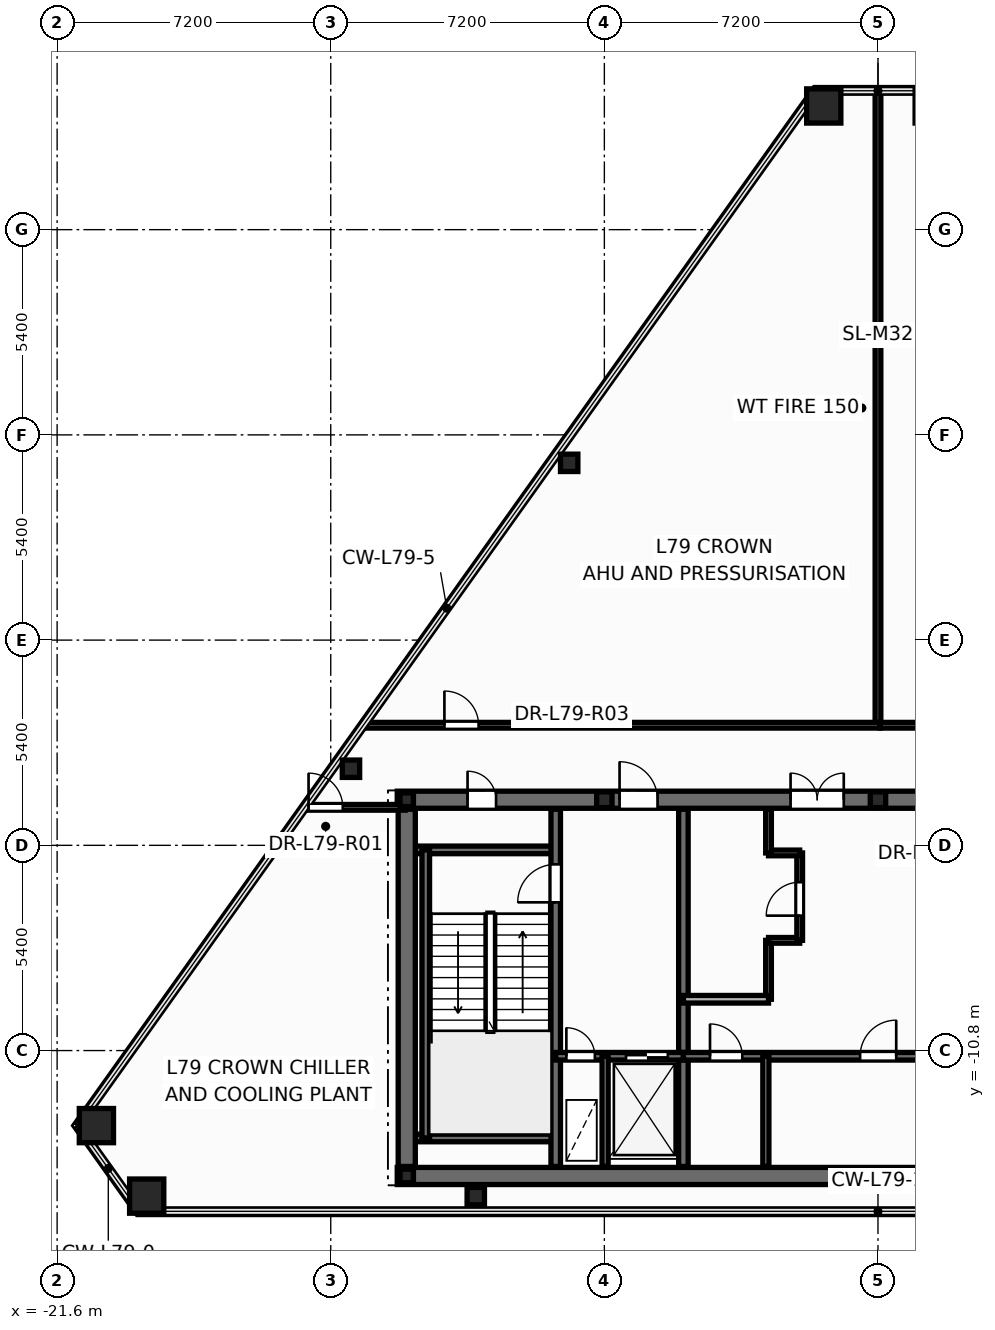
"""IFC4 building model, lengths in metres.
Left out: names, types, materials, properties, quantities, classifications, styles, units other than length and angle.
Written with IfcOpenShell. Run it as: python <this file> out.ifc"""

import sys

from ifc_helpers import new_model, si_unit, direction, frame, frame_2d, origin, origin_2d, place, context, subcontext, project, spatial, rectangle, hollow_rectangle, hollow_circle, i_section, extrude, element, fill, save


model = new_model("IFC4")
c1 = context("Model", 3, precision=1e-05, world=origin(), true_north=direction((0.0, 1.0)))
c2 = subcontext(c1, "Body", "Model", "MODEL_VIEW")
j1 = project(units=[si_unit("LENGTHUNIT", "METRE"), si_unit("PLANEANGLEUNIT", "RADIAN")], contexts=[c1])
p1 = place(None, origin())
s1 = spatial("IfcSite", under=j1, at=p1, CompositionType="ELEMENT")
p2 = place(p1, origin())
s2 = spatial("IfcBuilding", under=s1, at=p2, CompositionType="ELEMENT")
p3 = place(p2, frame((0.0, 0.0, 301.8)))
s3 = spatial("IfcBuildingStorey", under=s2, at=p3, CompositionType="ELEMENT", Elevation=301.8)
for number, where, z_axis, x_axis in (
    (1, (-20.567, -12.775, 0.0), (0.0, 0.0, 1.0), (1.0, 0.0, 0.0)),
    (2, (-19.243, -14.63, 0.0), (0.0, 0.0, 1.0), (1.0, 0.0, 0.0)),
    (3, (1.427, 14.055, 0.0), (0.0, 0.0, 1.0), (1.0, 0.0, 0.0)),
    (4, (-1.427, 14.055, 0.0), (0.0, 0.0, 1.0), (1.0, 0.0, 0.0)),
):
    element("IfcColumn", number, at=place(p3, frame(where, z_axis=z_axis, x_axis=x_axis)), inside=s3, PredefinedType="COLUMN", context=c2, shape_type="SweptSolid", body=[
        extrude(hollow_rectangle(XDim=0.9, YDim=0.9, WallThickness=0.04, at=origin_2d()), origin(), (0.0, 0.0, 1.0), 4.2),
    ])
for number, where, z_axis, x_axis in (
    (5, (-10.583, -14.63, 0.0), (0.0, 0.0, 1.0), (1.0, 0.0, 0.0)),
    (6, (-8.126, 4.664, 0.0), (0.0, 0.0, 1.0), (1.0, 0.0, 0.0)),
    (7, (-13.868, -3.385, 0.0), (0.0, 0.0, 1.0), (1.0, 0.0, 0.0)),
):
    element("IfcColumn", number, at=place(p3, frame(where, z_axis=z_axis, x_axis=x_axis)), inside=s3, PredefinedType="COLUMN", context=c2, shape_type="SweptSolid", body=[
        extrude(hollow_circle(Radius=0.229, WallThickness=0.016, at=origin_2d()), origin(), (0.0, 0.0, 1.0), 4.2),
    ])
for number, where, z_axis, x_axis in (
    (8, (-12.4, -14.1, 0.0), (0.0, 0.0, 1.0), (1.0, 0.0, 0.0)),
    (9, (-12.4, -4.2, 0.0), (0.0, 0.0, 1.0), (1.0, 0.0, 0.0)),
):
    element("IfcColumn", number, at=place(p3, frame(where, z_axis=z_axis, x_axis=x_axis)), inside=s3, PredefinedType="COLUMN", context=c2, shape_type="SweptSolid", body=[
        extrude(i_section(OverallWidth=0.352, OverallDepth=0.359, WebThickness=0.018, FlangeThickness=0.026, at=origin_2d()), origin(), (0.0, 0.0, 1.0), 4.2),
    ])
for number, where, z_axis, x_axis in (
    (10, (-7.2, -4.2, 0.0), (0.0, 0.0, 1.0), (1.0, 0.0, 0.0)),
    (11, (0.0, -4.2, 0.0), (0.0, 0.0, 1.0), (1.0, 0.0, 0.0)),
):
    element("IfcColumn", number, at=place(p3, frame(where, z_axis=z_axis, x_axis=x_axis)), inside=s3, PredefinedType="PILASTER", context=c2, shape_type="SweptSolid", body=[
        extrude(i_section(OverallWidth=0.405, OverallDepth=0.414, WebThickness=0.022, FlangeThickness=0.032, at=origin_2d()), origin(), (0.0, 0.0, 1.0), 4.2),
    ])
p4 = place(p3, frame((-2.88, -9.45, 0.0), z_axis=(0.0, 0.0, 1.0), x_axis=(0.0, 1.0, 0.0)))
e12 = element("IfcWall", 12, at=p4, inside=s3, PredefinedType="PARTITIONING", context=c2, shape_type="SweptSolid", body=[
    extrude(rectangle(XDim=1.55, YDim=0.15, at=frame_2d((0.775, 0.0))), origin(), (0.0, 0.0, 1.0), 3.88),
])
p5 = place(p3, frame((-2.88, -7.9, 0.0), z_axis=(0.0, 0.0, 1.0), x_axis=(1.0, 0.0, 0.0)))
e13 = element("IfcWall", 13, at=p5, inside=s3, PredefinedType="PARTITIONING", context=c2, shape_type="SweptSolid", body=[
    extrude(rectangle(XDim=0.82, YDim=0.15, at=frame_2d((0.41, 0.0))), origin(), (0.0, 0.0, 1.0), 3.88),
])
p6 = place(p3, frame((-2.06, -7.9, 0.0), z_axis=(0.0, 0.0, 1.0), x_axis=(0.0, 1.0, 0.0)))
e14 = element("IfcWall", 14, at=p6, inside=s3, PredefinedType="PARTITIONING", context=c2, shape_type="SweptSolid", body=[
    extrude(rectangle(XDim=2.3, YDim=0.15, at=frame_2d((1.15, 0.0))), origin(), (0.0, 0.0, 1.0), 3.88),
])
p7 = place(p6, frame((0.65, 0.0, 0.0)))
e15 = element("IfcOpeningElement", 15, at=p7, cuts=e14, PredefinedType="OPENING", context=c2, shape_type="SweptSolid", body=[
    extrude(rectangle(XDim=0.886, YDim=2.104, at=frame_2d((0.44, 1.052))), frame((0.0, 0.085, 0.0), z_axis=(0.0, -1.0, 0.0), x_axis=(1.0, 0.0, 0.0)), (0.0, 0.0, 1.0), 0.17),
])
p8 = place(p3, frame((-2.88, -5.6, 0.0), z_axis=(0.0, 0.0, 1.0), x_axis=(1.0, 0.0, 0.0)))
e16 = element("IfcWall", 16, at=p8, inside=s3, PredefinedType="PARTITIONING", context=c2, shape_type="SweptSolid", body=[
    extrude(rectangle(XDim=0.82, YDim=0.15, at=frame_2d((0.41, 0.0))), origin(), (0.0, 0.0, 1.0), 3.88),
])
p9 = place(p3, frame((-2.88, -5.6, 0.0), z_axis=(0.0, 0.0, 1.0), x_axis=(0.0, 1.0, 0.0)))
e17 = element("IfcWall", 17, at=p9, inside=s3, PredefinedType="PARTITIONING", context=c2, shape_type="SweptSolid", body=[
    extrude(rectangle(XDim=1.15, YDim=0.15, at=frame_2d((0.575, 0.0))), origin(), (0.0, 0.0, 1.0), 3.88),
])
p10 = place(p3, frame((-12.65, -14.1, 0.0), z_axis=(0.0, 0.0, 1.0), x_axis=(1.0, 0.0, 0.0)))
e18 = element("IfcWall", 18, at=p10, inside=s3, PredefinedType="SHEAR", context=c2, shape_type="SweptSolid", body=[
    extrude(rectangle(XDim=25.3, YDim=0.45, at=frame_2d((12.65, 0.0))), origin(), (0.0, 0.0, 1.0), 4.2),
])
p11 = place(p3, frame((-12.65, -4.2, 0.0), z_axis=(0.0, 0.0, 1.0), x_axis=(1.0, 0.0, 0.0)))
e19 = element("IfcWall", 19, at=p11, inside=s3, PredefinedType="SHEAR", context=c2, shape_type="SweptSolid", body=[
    extrude(rectangle(XDim=25.3, YDim=0.45, at=frame_2d((12.65, 0.0))), origin(), (0.0, 0.0, 1.0), 4.2),
])
p12 = place(p11, frame((1.85, 0.0, 0.0)))
e20 = element("IfcOpeningElement", 20, at=p12, cuts=e19, PredefinedType="OPENING", context=c2, shape_type="SweptSolid", body=[
    extrude(rectangle(XDim=0.756, YDim=2.054, at=frame_2d((0.375, 1.027))), frame((0.0, 0.235, 0.0), z_axis=(0.0, -1.0, 0.0), x_axis=(1.0, 0.0, 0.0)), (0.0, 0.0, 1.0), 0.47),
])
p13 = place(p11, frame((21.85, 0.0, 0.0)))
e21 = element("IfcOpeningElement", 21, at=p13, cuts=e19, PredefinedType="OPENING", context=c2, shape_type="SweptSolid", body=[
    extrude(rectangle(XDim=0.756, YDim=2.054, at=frame_2d((0.375, 1.027))), frame((0.0, 0.235, 0.0), z_axis=(0.0, -1.0, 0.0), x_axis=(1.0, 0.0, 0.0)), (0.0, 0.0, 1.0), 0.47),
])
p14 = place(p11, frame((23.5, 0.0, 0.0)))
e22 = element("IfcOpeningElement", 22, at=p14, cuts=e19, PredefinedType="OPENING", context=c2, shape_type="SweptSolid", body=[
    extrude(rectangle(XDim=0.756, YDim=2.054, at=frame_2d((0.375, 1.027))), frame((0.0, 0.235, 0.0), z_axis=(0.0, -1.0, 0.0), x_axis=(1.0, 0.0, 0.0)), (0.0, 0.0, 1.0), 0.47),
])
p15 = place(p11, frame((5.85, 0.0, 0.0)))
e23 = element("IfcOpeningElement", 23, at=p15, cuts=e19, PredefinedType="OPENING", context=c2, shape_type="SweptSolid", body=[
    extrude(rectangle(XDim=1.006, YDim=2.104, at=frame_2d((0.5, 1.052))), frame((0.0, 0.235, 0.0), z_axis=(0.0, -1.0, 0.0), x_axis=(1.0, 0.0, 0.0)), (0.0, 0.0, 1.0), 0.47),
])
p16 = place(p11, frame((10.35, 0.0, 0.0)))
e24 = element("IfcOpeningElement", 24, at=p16, cuts=e19, PredefinedType="OPENING", context=c2, shape_type="SweptSolid", body=[
    extrude(rectangle(XDim=1.406, YDim=2.154, at=frame_2d((0.7, 1.077))), frame((0.0, 0.235, 0.0), z_axis=(0.0, -1.0, 0.0), x_axis=(1.0, 0.0, 0.0)), (0.0, 0.0, 1.0), 0.47),
])
p17 = place(p11, frame((18.45, 0.0, 0.0)))
e25 = element("IfcOpeningElement", 25, at=p17, cuts=e19, PredefinedType="OPENING", context=c2, shape_type="SweptSolid", body=[
    extrude(rectangle(XDim=1.006, YDim=2.104, at=frame_2d((0.5, 1.052))), frame((0.0, 0.235, 0.0), z_axis=(0.0, -1.0, 0.0), x_axis=(1.0, 0.0, 0.0)), (0.0, 0.0, 1.0), 0.47),
])
for number, where, z_axis, x_axis in (
    (26, (-12.35, -5.52, 0.0), (0.0, 0.0, 1.0), (1.0, 0.0, 0.0)),
    (27, (-12.35, -13.1, 0.0), (0.0, 0.0, 1.0), (1.0, 0.0, 0.0)),
):
    element("IfcWall", number, at=place(p3, frame(where, z_axis=z_axis, x_axis=x_axis)), inside=s3, PredefinedType="SOLIDWALL", context=c2, shape_type="SweptSolid", body=[
        extrude(rectangle(XDim=3.87, YDim=0.2, at=frame_2d((1.935, 0.0))), origin(), (0.0, 0.0, 1.0), 4.2),
    ])
p18 = place(p3, frame((-11.9, -13.1, 0.0), z_axis=(0.0, 0.0, 1.0), x_axis=(0.0, 1.0, 0.0)))
e28 = element("IfcWall", 28, at=p18, inside=s3, PredefinedType="SOLIDWALL", context=c2, shape_type="SweptSolid", body=[
    extrude(rectangle(XDim=7.58, YDim=0.2, at=frame_2d((3.79, 0.0))), origin(), (0.0, 0.0, 1.0), 4.2),
])
p19 = place(p3, frame((-8.48, -13.85, 0.0), z_axis=(0.0, 0.0, 1.0), x_axis=(0.0, 1.0, 0.0)))
e29 = element("IfcWall", 29, at=p19, inside=s3, PredefinedType="SHEAR", context=c2, shape_type="SweptSolid", body=[
    extrude(rectangle(XDim=9.4, YDim=0.25, at=frame_2d((4.7, 0.0))), origin(), (0.0, 0.0, 1.0), 4.2),
])
p20 = place(p19, frame((6.95, 0.0, 0.0)))
e30 = element("IfcOpeningElement", 30, at=p20, cuts=e29, PredefinedType="OPENING", context=c2, shape_type="SweptSolid", body=[
    extrude(rectangle(XDim=1.006, YDim=2.104, at=frame_2d((0.5, 1.052))), frame((0.0, 0.135, 0.0), z_axis=(0.0, -1.0, 0.0), x_axis=(1.0, 0.0, 0.0)), (0.0, 0.0, 1.0), 0.27),
])
p21 = place(p3, frame((-5.12, -13.85, 0.0), z_axis=(0.0, 0.0, 1.0), x_axis=(0.0, 1.0, 0.0)))
e31 = element("IfcWall", 31, at=p21, inside=s3, PredefinedType="SHEAR", context=c2, shape_type="SweptSolid", body=[
    extrude(rectangle(XDim=9.4, YDim=0.25, at=frame_2d((4.7, 0.0))), origin(), (0.0, 0.0, 1.0), 4.2),
])
p22 = place(p3, frame((-8.48, -10.95, 0.0), z_axis=(0.0, 0.0, 1.0), x_axis=(1.0, 0.0, 0.0)))
e32 = element("IfcWall", 32, at=p22, inside=s3, PredefinedType="SOLIDWALL", context=c2, shape_type="SweptSolid", body=[
    extrude(rectangle(XDim=3.36, YDim=0.2, at=frame_2d((1.68, 0.0))), origin(), (0.0, 0.0, 1.0), 4.2),
])
p23 = place(p22, frame((0.28, 0.0, 0.0)))
e33 = element("IfcOpeningElement", 33, at=p23, cuts=e32, PredefinedType="OPENING", context=c2, shape_type="SweptSolid", body=[
    extrude(rectangle(XDim=0.756, YDim=2.054, at=frame_2d((0.375, 1.027))), frame((0.0, 0.11, 0.0), z_axis=(0.0, -1.0, 0.0), x_axis=(1.0, 0.0, 0.0)), (0.0, 0.0, 1.0), 0.22),
])
p24 = place(p22, frame((1.85, 0.0, 0.0)))
e34 = element("IfcOpeningElement", 34, at=p24, cuts=e32, PredefinedType="OPENING", context=c2, shape_type="SweptSolid", body=[
    extrude(rectangle(XDim=1.106, YDim=2.104, at=frame_2d((0.55, 1.052))), frame((0.0, 0.11, 0.0), z_axis=(0.0, -1.0, 0.0), x_axis=(1.0, 0.0, 0.0)), (0.0, 0.0, 1.0), 0.22),
])
p25 = place(p3, frame((-5.12, -10.95, 0.0), z_axis=(0.0, 0.0, 1.0), x_axis=(1.0, 0.0, 0.0)))
e35 = element("IfcWall", 35, at=p25, inside=s3, PredefinedType="SOLIDWALL", context=c2, shape_type="SweptSolid", body=[
    extrude(rectangle(XDim=10.24, YDim=0.2, at=frame_2d((5.12, 0.0))), origin(), (0.0, 0.0, 1.0), 4.2),
])
p26 = place(p25, frame((0.7, 0.0, 0.0)))
e36 = element("IfcOpeningElement", 36, at=p26, cuts=e35, PredefinedType="OPENING", context=c2, shape_type="SweptSolid", body=[
    extrude(rectangle(XDim=0.856, YDim=2.054, at=frame_2d((0.425, 1.027))), frame((0.0, 0.11, 0.0), z_axis=(0.0, -1.0, 0.0), x_axis=(1.0, 0.0, 0.0)), (0.0, 0.0, 1.0), 0.22),
])
p27 = place(p25, frame((4.65, 0.0, 0.0)))
e37 = element("IfcOpeningElement", 37, at=p27, cuts=e35, PredefinedType="OPENING", context=c2, shape_type="SweptSolid", body=[
    extrude(rectangle(XDim=0.956, YDim=2.104, at=frame_2d((0.475, 1.052))), frame((0.0, 0.11, 0.0), z_axis=(0.0, -1.0, 0.0), x_axis=(1.0, 0.0, 0.0)), (0.0, 0.0, 1.0), 0.22),
])
p28 = place(p25, frame((8.54, 0.0, 0.0)))
e38 = element("IfcOpeningElement", 38, at=p28, cuts=e35, PredefinedType="OPENING", context=c2, shape_type="SweptSolid", body=[
    extrude(rectangle(XDim=1.106, YDim=2.104, at=frame_2d((0.55, 1.052))), frame((0.0, 0.11, 0.0), z_axis=(0.0, -1.0, 0.0), x_axis=(1.0, 0.0, 0.0)), (0.0, 0.0, 1.0), 0.22),
])
for number, where, z_axis, x_axis in (
    (39, (-7.18, -13.85, 0.0), (0.0, 0.0, 1.0), (0.0, 1.0, 0.0)),
    (40, (-2.95, -13.85, 0.0), (0.0, 0.0, 1.0), (0.0, 1.0, 0.0)),
):
    element("IfcWall", number, at=place(p3, frame(where, z_axis=z_axis, x_axis=x_axis)), inside=s3, PredefinedType="PARTITIONING", context=c2, shape_type="SweptSolid", body=[
        extrude(rectangle(XDim=2.9, YDim=0.16, at=frame_2d((1.45, 0.0))), origin(), (0.0, 0.0, 1.0), 3.105),
    ])
p29 = place(p3, frame((-12.4, -13.85, 0.0), z_axis=(0.0, 0.0, 1.0), x_axis=(0.0, 1.0, 0.0)))
e41 = element("IfcWall", 41, at=p29, inside=s3, PredefinedType="SHEAR", context=c2, shape_type="SweptSolid", body=[
    extrude(rectangle(XDim=9.4, YDim=0.45, at=frame_2d((4.7, 0.0))), origin(), (0.0, 0.0, 1.0), 4.2),
])
p30 = place(p3, frame((-5.12, -9.45, 0.0), z_axis=(0.0, 0.0, 1.0), x_axis=(1.0, 0.0, 0.0)))
e42 = element("IfcWall", 42, at=p30, inside=s3, PredefinedType="SOLIDWALL", context=c2, shape_type="SweptSolid", body=[
    extrude(rectangle(XDim=2.24, YDim=0.2, at=frame_2d((1.12, 0.0))), origin(), (0.0, 0.0, 1.0), 3.88),
])
p31 = place(p3, frame((0.0, -2.24, 0.0), z_axis=(0.0, 0.0, 1.0), x_axis=(0.0, 1.0, 0.0)))
e43 = element("IfcWall", 43, at=p31, inside=s3, PredefinedType="PARTITIONING", context=c2, shape_type="SweptSolid", body=[
    extrude(rectangle(XDim=16.695, YDim=0.15, at=frame_2d((8.347, 0.0))), origin(), (0.0, 0.0, 1.0), 2.855),
])
p32 = place(p3, frame((-13.543, -2.24, 0.0), z_axis=(0.0, 0.0, 1.0), x_axis=(1.0, 0.0, 0.0)))
e44 = element("IfcWall", 44, at=p32, inside=s3, PredefinedType="PARTITIONING", context=c2, shape_type="SweptSolid", body=[
    extrude(rectangle(XDim=13.603, YDim=0.15, at=frame_2d((6.801, 0.0))), origin(), (0.0, 0.0, 1.0), 2.855),
])
p33 = place(p32, frame((2.134, 0.0, 0.0)))
e45 = element("IfcOpeningElement", 45, at=p33, cuts=e44, PredefinedType="OPENING", context=c2, shape_type="SweptSolid", body=[
    extrude(rectangle(XDim=0.906, YDim=2.104, at=frame_2d((0.45, 1.052))), frame((0.0, 0.085, 0.0), z_axis=(0.0, -1.0, 0.0), x_axis=(1.0, 0.0, 0.0)), (0.0, 0.0, 1.0), 0.17),
])
p34 = place(p3, frame((0.062, -2.24, 0.0), z_axis=(0.0, 0.0, 1.0), x_axis=(1.0, 0.0, 0.0)))
e46 = element("IfcWall", 46, at=p34, inside=s3, PredefinedType="PARTITIONING", context=c2, shape_type="SweptSolid", body=[
    extrude(rectangle(XDim=13.481, YDim=0.15, at=frame_2d((6.74, 0.0))), origin(), (0.0, 0.0, 1.0), 2.855),
])
p35 = place(p34, frame((0.995, 0.0, 0.0)))
e47 = element("IfcOpeningElement", 47, at=p35, cuts=e46, PredefinedType="OPENING", context=c2, shape_type="SweptSolid", body=[
    extrude(rectangle(XDim=0.906, YDim=2.104, at=frame_2d((0.45, 1.052))), frame((0.0, 0.085, 0.0), z_axis=(0.0, -1.0, 0.0), x_axis=(1.0, 0.0, 0.0)), (0.0, 0.0, 1.0), 0.17),
])
p36 = place(p3, frame((-15.083, -4.4, 0.0), z_axis=(0.0, 0.0, 1.0), x_axis=(1.0, 0.0, 0.0)))
e48 = element("IfcWall", 48, at=p36, inside=s3, PredefinedType="PARTITIONING", context=c2, shape_type="SweptSolid", body=[
    extrude(rectangle(XDim=2.644, YDim=0.15, at=frame_2d((1.322, 0.0))), origin(), (0.0, 0.0, 1.0), 2.855),
])
p37 = place(p36, frame((0.1, 0.0, 0.0)))
e49 = element("IfcOpeningElement", 49, at=p37, cuts=e48, PredefinedType="OPENING", context=c2, shape_type="SweptSolid", body=[
    extrude(rectangle(XDim=0.906, YDim=2.104, at=frame_2d((0.45, 1.052))), frame((0.0, 0.085, 0.0), z_axis=(0.0, -1.0, 0.0), x_axis=(1.0, 0.0, 0.0)), (0.0, 0.0, 1.0), 0.17),
])
p38 = place(p7, origin())
e50 = element("IfcDoor", 50, at=p38, inside=s3, OperationType="SINGLE_SWING_LEFT", PredefinedType="DOOR", context=c2, shape_type="SweptSolid", body=[
    extrude(rectangle(XDim=0.88, YDim=2.1, at=frame_2d((0.44, 1.05))), frame((0.0, 0.025, 0.0), z_axis=(0.0, -1.0, 0.0), x_axis=(1.0, 0.0, 0.0)), (0.0, 0.0, 1.0), 0.05),
])
fill(e15, e50)
p39 = place(p20, origin())
e51 = element("IfcDoor", 51, at=p39, inside=s3, OperationType="SINGLE_SWING_LEFT", PredefinedType="DOOR", context=c2, shape_type="SweptSolid", body=[
    extrude(rectangle(XDim=1.0, YDim=2.1, at=frame_2d((0.5, 1.05))), frame((0.0, 0.025, 0.0), z_axis=(0.0, -1.0, 0.0), x_axis=(1.0, 0.0, 0.0)), (0.0, 0.0, 1.0), 0.05),
])
fill(e30, e51)
p40 = place(p23, origin())
e52 = element("IfcDoor", 52, at=p40, inside=s3, OperationType="SINGLE_SWING_LEFT", PredefinedType="DOOR", context=c2, shape_type="SweptSolid", body=[
    extrude(rectangle(XDim=0.75, YDim=2.05, at=frame_2d((0.375, 1.025))), frame((0.0, 0.025, 0.0), z_axis=(0.0, -1.0, 0.0), x_axis=(1.0, 0.0, 0.0)), (0.0, 0.0, 1.0), 0.05),
])
fill(e33, e52)
p41 = place(p24, origin())
e53 = element("IfcDoor", 53, at=p41, inside=s3, OperationType="DOUBLE_DOOR_SLIDING", PredefinedType="DOOR", context=c2, shape_type="SweptSolid", body=[
    extrude(rectangle(XDim=1.1, YDim=2.1, at=frame_2d((0.55, 1.05))), frame((0.0, 0.025, 0.0), z_axis=(0.0, -1.0, 0.0), x_axis=(1.0, 0.0, 0.0)), (0.0, 0.0, 1.0), 0.05),
])
fill(e34, e53)
p42 = place(p26, origin())
e54 = element("IfcDoor", 54, at=p42, inside=s3, OperationType="SINGLE_SWING_LEFT", PredefinedType="DOOR", context=c2, shape_type="SweptSolid", body=[
    extrude(rectangle(XDim=0.85, YDim=2.05, at=frame_2d((0.425, 1.025))), frame((0.0, 0.025, 0.0), z_axis=(0.0, -1.0, 0.0), x_axis=(1.0, 0.0, 0.0)), (0.0, 0.0, 1.0), 0.05),
])
fill(e36, e54)
p43 = place(p27, origin())
e55 = element("IfcDoor", 55, at=p43, inside=s3, OperationType="SINGLE_SWING_RIGHT", PredefinedType="DOOR", context=c2, shape_type="SweptSolid", body=[
    extrude(rectangle(XDim=0.95, YDim=2.1, at=frame_2d((0.475, 1.05))), frame((0.0, 0.025, 0.0), z_axis=(0.0, -1.0, 0.0), x_axis=(1.0, 0.0, 0.0)), (0.0, 0.0, 1.0), 0.05),
])
fill(e37, e55)
p44 = place(p12, origin())
e56 = element("IfcDoor", 56, at=p44, inside=s3, OperationType="SINGLE_SWING_LEFT", PredefinedType="DOOR", context=c2, shape_type="SweptSolid", body=[
    extrude(rectangle(XDim=0.75, YDim=2.05, at=frame_2d((0.375, 1.025))), frame((0.0, 0.025, 0.0), z_axis=(0.0, -1.0, 0.0), x_axis=(1.0, 0.0, 0.0)), (0.0, 0.0, 1.0), 0.05),
])
fill(e20, e56)
p45 = place(p15, origin())
e57 = element("IfcDoor", 57, at=p45, inside=s3, OperationType="SINGLE_SWING_LEFT", PredefinedType="DOOR", context=c2, shape_type="SweptSolid", body=[
    extrude(rectangle(XDim=1.0, YDim=2.1, at=frame_2d((0.5, 1.05))), frame((0.0, 0.025, 0.0), z_axis=(0.0, -1.0, 0.0), x_axis=(1.0, 0.0, 0.0)), (0.0, 0.0, 1.0), 0.05),
])
fill(e23, e57)
p46 = place(p16, origin())
e58 = element("IfcDoor", 58, at=p46, inside=s3, OperationType="DOUBLE_DOOR_SINGLE_SWING", PredefinedType="DOOR", context=c2, shape_type="SweptSolid", body=[
    extrude(rectangle(XDim=1.4, YDim=2.15, at=frame_2d((0.7, 1.075))), frame((0.0, 0.025, 0.0), z_axis=(0.0, -1.0, 0.0), x_axis=(1.0, 0.0, 0.0)), (0.0, 0.0, 1.0), 0.05),
])
fill(e24, e58)
p47 = place(p37, origin())
e59 = element("IfcDoor", 59, at=p47, inside=s3, OperationType="SINGLE_SWING_LEFT", PredefinedType="DOOR", context=c2, shape_type="SweptSolid", body=[
    extrude(rectangle(XDim=0.9, YDim=2.1, at=frame_2d((0.45, 1.05))), frame((0.0, 0.025, 0.0), z_axis=(0.0, -1.0, 0.0), x_axis=(1.0, 0.0, 0.0)), (0.0, 0.0, 1.0), 0.05),
])
fill(e49, e59)
p48 = place(p33, origin())
e60 = element("IfcDoor", 60, at=p48, inside=s3, OperationType="SINGLE_SWING_LEFT", PredefinedType="DOOR", context=c2, shape_type="SweptSolid", body=[
    extrude(rectangle(XDim=0.9, YDim=2.1, at=frame_2d((0.45, 1.05))), frame((0.0, 0.025, 0.0), z_axis=(0.0, -1.0, 0.0), x_axis=(1.0, 0.0, 0.0)), (0.0, 0.0, 1.0), 0.05),
])
fill(e45, e60)
save(model, sys.argv[1])
